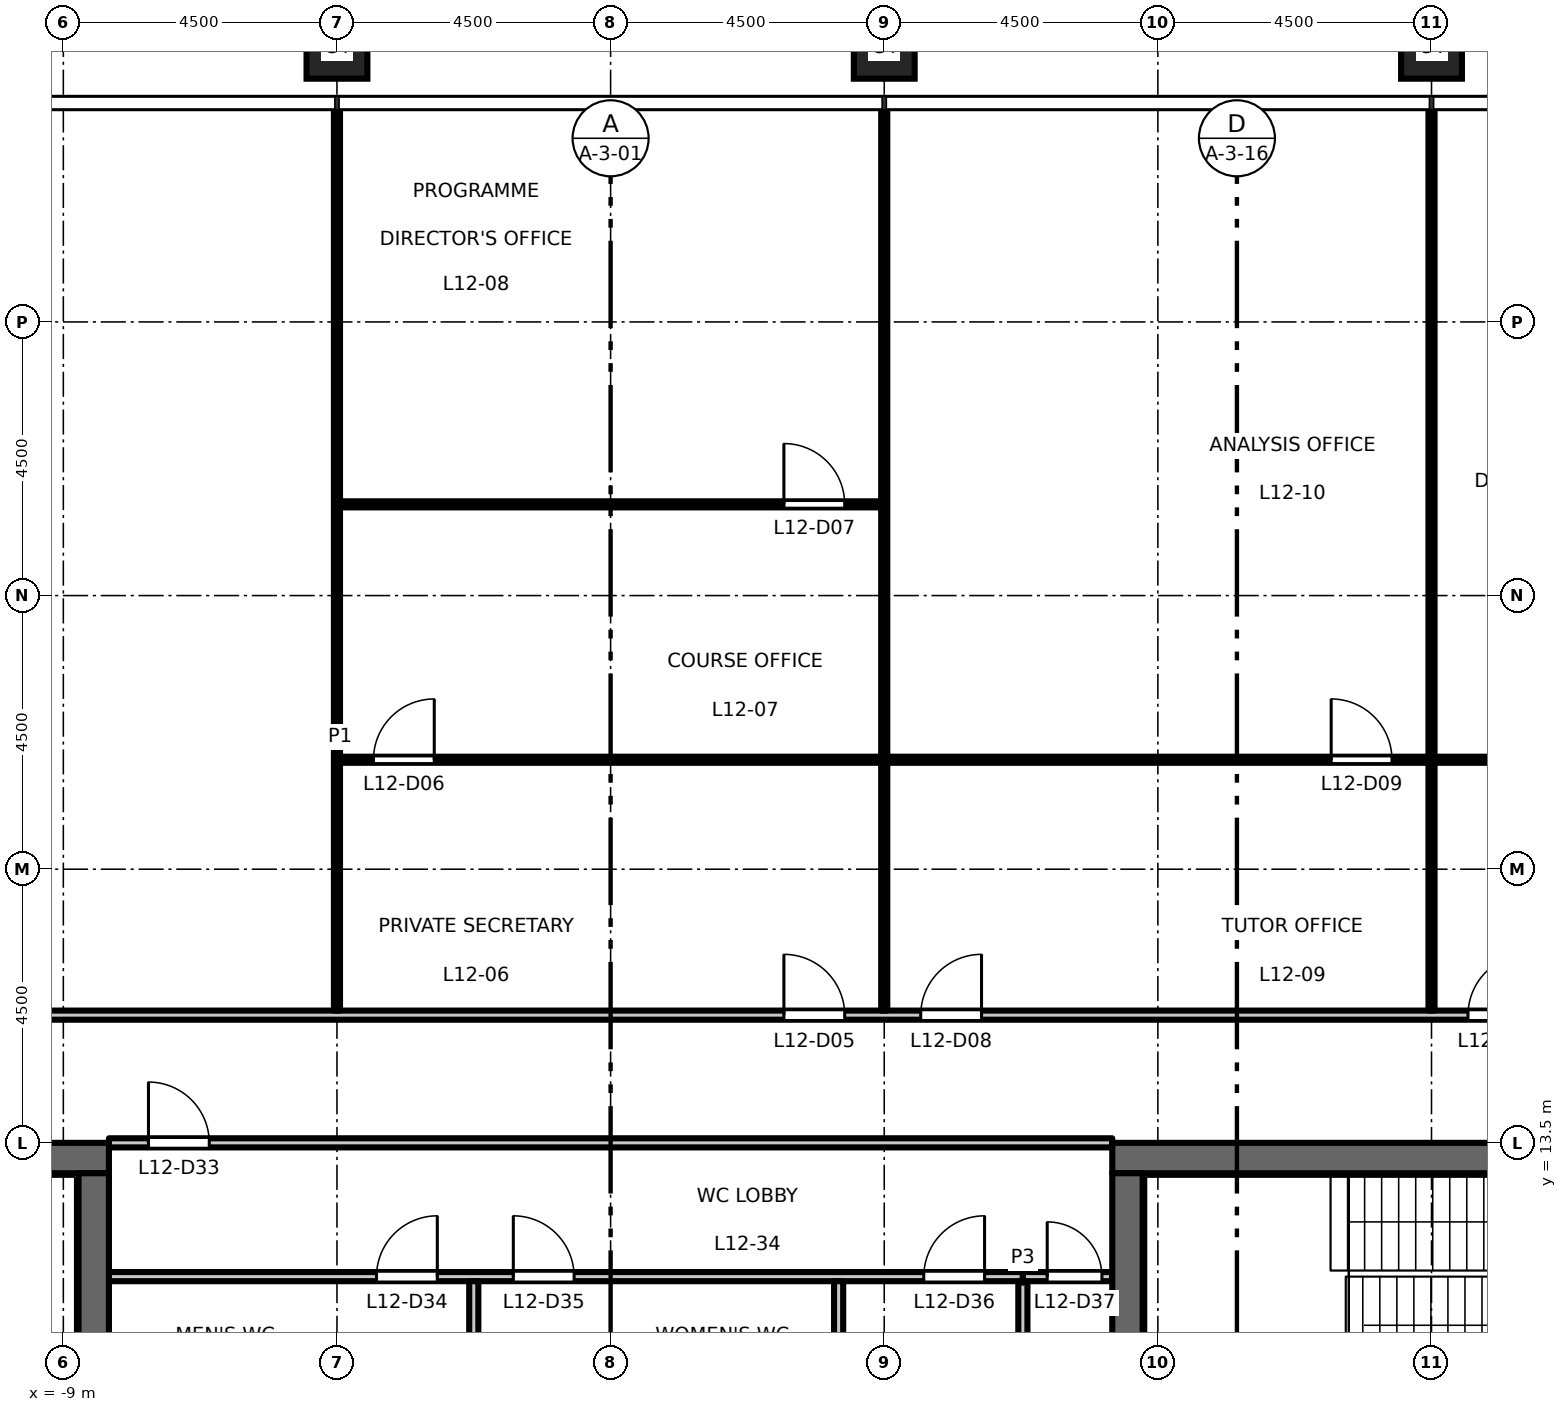
"""IFC4 building model, lengths in metres.
Left out: names, types, materials, properties, quantities, classifications, styles, units other than length and angle.
Written with IfcOpenShell. Run it as: python <this file> out.ifc"""

import sys

from ifc_helpers import new_model, si_unit, direction, frame, frame_2d, origin, origin_2d, place, context, subcontext, project, spatial, rectangle, hollow_rectangle, extrude, element, fill, save


model = new_model("IFC4")
c1 = context("Model", 3, precision=1e-05, world=origin(), true_north=direction((0.0, 1.0)))
c2 = subcontext(c1, "Body", "Model", "MODEL_VIEW")
j1 = project(units=[si_unit("LENGTHUNIT", "METRE"), si_unit("PLANEANGLEUNIT", "RADIAN")], contexts=[c1])
p1 = place(None, origin())
s1 = spatial("IfcSite", under=j1, at=p1, CompositionType="ELEMENT")
p2 = place(p1, origin())
s2 = spatial("IfcBuilding", under=s1, at=p2, CompositionType="ELEMENT")
p3 = place(p2, frame((0.0, 0.0, 58.2)))
s3 = spatial("IfcBuildingStorey", under=s2, at=p3, CompositionType="ELEMENT", Elevation=58.2)
for number, where, z_axis, x_axis in (
    (1, (13.5, 31.5, 0.0), (0.0, 0.0, 1.0), (1.0, 0.0, 0.0)),
    (2, (4.5, 31.5, 0.0), (0.0, 0.0, 1.0), (1.0, 0.0, 0.0)),
    (3, (-4.5, 31.5, 0.0), (0.0, 0.0, 1.0), (1.0, 0.0, 0.0)),
):
    element("IfcColumn", number, at=place(p3, frame(where, z_axis=z_axis, x_axis=x_axis)), inside=s3, PredefinedType="COLUMN", context=c2, shape_type="SweptSolid", body=[
        extrude(hollow_rectangle(XDim=1.0, YDim=1.0, WallThickness=0.06, at=origin_2d()), origin(), (0.0, 0.0, 1.0), 4.5),
    ])
p4 = place(p3, frame((-8.25, 13.25, 0.0), z_axis=(0.0, 0.0, 1.0), x_axis=(-1.0, 0.0, 0.0)))
e4 = element("IfcWall", 4, at=p4, inside=s3, PredefinedType="SHEAR", context=c2, shape_type="SweptSolid", body=[
    extrude(rectangle(XDim=13.5, YDim=0.5, at=frame_2d((6.75, 0.0))), origin(), (0.0, 0.0, 1.0), 4.35),
])
p5 = place(p3, frame((-8.5, -13.0, 0.0), z_axis=(0.0, 0.0, 1.0), x_axis=(0.0, 1.0, 0.0)))
e5 = element("IfcWall", 5, at=p5, inside=s3, PredefinedType="SHEAR", context=c2, shape_type="SweptSolid", body=[
    extrude(rectangle(XDim=26.0, YDim=0.5, at=frame_2d((13.0, 0.0))), origin(), (0.0, 0.0, 1.0), 4.35),
])
p6 = place(p3, frame((8.25, 13.25, 0.0), z_axis=(0.0, 0.0, 1.0), x_axis=(1.0, 0.0, 0.0)))
e6 = element("IfcWall", 6, at=p6, inside=s3, PredefinedType="SHEAR", context=c2, shape_type="SweptSolid", body=[
    extrude(rectangle(XDim=13.5, YDim=0.5, at=frame_2d((6.75, 0.0))), origin(), (0.0, 0.0, 1.0), 4.35),
])
p7 = place(p3, frame((8.5, -13.0, 0.0), z_axis=(0.0, 0.0, 1.0), x_axis=(0.0, 1.0, 0.0)))
e7 = element("IfcWall", 7, at=p7, inside=s3, PredefinedType="SHEAR", context=c2, shape_type="SweptSolid", body=[
    extrude(rectangle(XDim=26.0, YDim=0.5, at=frame_2d((13.0, 0.0))), origin(), (0.0, 0.0, 1.0), 4.35),
])
p8 = place(p3, frame((-8.25, 11.3, 0.0), z_axis=(0.0, 0.0, 1.0), x_axis=(1.0, 0.0, 0.0)))
e8 = element("IfcWall", 8, at=p8, inside=s3, PredefinedType="PARTITIONING", context=c2, shape_type="SweptSolid", body=[
    extrude(rectangle(XDim=15.03, YDim=0.15, at=frame_2d((7.515, 0.0))), origin(), (0.0, 0.0, 1.0), 4.35),
])
p9 = place(p8, frame((4.4, 0.0, 0.0)))
e9 = element("IfcOpeningElement", 9, at=p9, cuts=e8, PredefinedType="OPENING", context=c2, shape_type="SweptSolid", body=[
    extrude(rectangle(XDim=1.0, YDim=2.1, at=frame_2d((0.5, 1.05))), frame((0.0, 0.085, 0.0), z_axis=(0.0, -1.0, 0.0), x_axis=(1.0, 0.0, 0.0)), (0.0, 0.0, 1.0), 0.17),
])
p10 = place(p8, frame((6.65, 0.0, 0.0)))
e10 = element("IfcOpeningElement", 10, at=p10, cuts=e8, PredefinedType="OPENING", context=c2, shape_type="SweptSolid", body=[
    extrude(rectangle(XDim=1.0, YDim=2.1, at=frame_2d((0.5, 1.05))), frame((0.0, 0.085, 0.0), z_axis=(0.0, -1.0, 0.0), x_axis=(1.0, 0.0, 0.0)), (0.0, 0.0, 1.0), 0.17),
])
p11 = place(p8, frame((13.4, 0.0, 0.0)))
e11 = element("IfcOpeningElement", 11, at=p11, cuts=e8, PredefinedType="OPENING", context=c2, shape_type="SweptSolid", body=[
    extrude(rectangle(XDim=1.0, YDim=2.1, at=frame_2d((0.5, 1.05))), frame((0.0, 0.085, 0.0), z_axis=(0.0, -1.0, 0.0), x_axis=(1.0, 0.0, 0.0)), (0.0, 0.0, 1.0), 0.17),
])
p12 = place(p3, frame((6.78, 11.3, 0.0), z_axis=(0.0, 0.0, 1.0), x_axis=(1.0, 0.0, 0.0)))
e12 = element("IfcWall", 12, at=p12, inside=s3, PredefinedType="PARTITIONING", context=c2, shape_type="SweptSolid", body=[
    extrude(rectangle(XDim=1.47, YDim=0.15, at=frame_2d((0.735, 0.0))), origin(), (0.0, 0.0, 1.0), 4.35),
])
p13 = place(p12, frame((0.4, 0.0, 0.0)))
e13 = element("IfcOpeningElement", 13, at=p13, cuts=e12, PredefinedType="OPENING", context=c2, shape_type="SweptSolid", body=[
    extrude(rectangle(XDim=0.9, YDim=2.1, at=frame_2d((0.45, 1.05))), frame((0.0, 0.085, 0.0), z_axis=(0.0, -1.0, 0.0), x_axis=(1.0, 0.0, 0.0)), (0.0, 0.0, 1.0), 0.17),
])
p14 = place(p3, frame((-8.25, 13.5, 0.0), z_axis=(0.0, 0.0, 1.0), x_axis=(1.0, 0.0, 0.0)))
e14 = element("IfcWall", 14, at=p14, inside=s3, PredefinedType="PARTITIONING", context=c2, shape_type="SweptSolid", body=[
    extrude(rectangle(XDim=16.5, YDim=0.15, at=frame_2d((8.25, 0.0))), origin(), (0.0, 0.0, 1.0), 3.85),
])
p15 = place(p14, frame((0.65, 0.0, 0.0)))
e15 = element("IfcOpeningElement", 15, at=p15, cuts=e14, PredefinedType="OPENING", context=c2, shape_type="SweptSolid", body=[
    extrude(rectangle(XDim=1.0, YDim=2.1, at=frame_2d((0.5, 1.05))), frame((0.0, 0.085, 0.0), z_axis=(0.0, -1.0, 0.0), x_axis=(1.0, 0.0, 0.0)), (0.0, 0.0, 1.0), 0.17),
])
p16 = place(p3, frame((-23.925, 15.6, 0.0), z_axis=(0.0, 0.0, 1.0), x_axis=(1.0, 0.0, 0.0)))
e16 = element("IfcWall", 16, at=p16, inside=s3, PredefinedType="PARTITIONING", context=c2, shape_type="SweptSolid", body=[
    extrude(rectangle(XDim=47.85, YDim=0.15, at=frame_2d((23.925, 0.0))), origin(), (0.0, 0.0, 1.0), 4.35),
])
p17 = place(p16, frame((8.775, 0.0, 0.0)))
e17 = element("IfcOpeningElement", 17, at=p17, cuts=e16, PredefinedType="OPENING", context=c2, shape_type="SweptSolid", body=[
    extrude(rectangle(XDim=1.0, YDim=2.1, at=frame_2d((0.5, 1.05))), frame((0.0, 0.085, 0.0), z_axis=(0.0, -1.0, 0.0), x_axis=(1.0, 0.0, 0.0)), (0.0, 0.0, 1.0), 0.17),
])
p18 = place(p16, frame((11.025, 0.0, 0.0)))
e18 = element("IfcOpeningElement", 18, at=p18, cuts=e16, PredefinedType="OPENING", context=c2, shape_type="SweptSolid", body=[
    extrude(rectangle(XDim=1.0, YDim=2.1, at=frame_2d((0.5, 1.05))), frame((0.0, 0.085, 0.0), z_axis=(0.0, -1.0, 0.0), x_axis=(1.0, 0.0, 0.0)), (0.0, 0.0, 1.0), 0.17),
])
p19 = place(p16, frame((26.775, 0.0, 0.0)))
e19 = element("IfcOpeningElement", 19, at=p19, cuts=e16, PredefinedType="OPENING", context=c2, shape_type="SweptSolid", body=[
    extrude(rectangle(XDim=1.0, YDim=2.1, at=frame_2d((0.5, 1.05))), frame((0.0, 0.085, 0.0), z_axis=(0.0, -1.0, 0.0), x_axis=(1.0, 0.0, 0.0)), (0.0, 0.0, 1.0), 0.17),
])
p20 = place(p16, frame((29.025, 0.0, 0.0)))
e20 = element("IfcOpeningElement", 20, at=p20, cuts=e16, PredefinedType="OPENING", context=c2, shape_type="SweptSolid", body=[
    extrude(rectangle(XDim=1.0, YDim=2.1, at=frame_2d((0.5, 1.05))), frame((0.0, 0.085, 0.0), z_axis=(0.0, -1.0, 0.0), x_axis=(1.0, 0.0, 0.0)), (0.0, 0.0, 1.0), 0.17),
])
p21 = place(p16, frame((38.025, 0.0, 0.0)))
e21 = element("IfcOpeningElement", 21, at=p21, cuts=e16, PredefinedType="OPENING", context=c2, shape_type="SweptSolid", body=[
    extrude(rectangle(XDim=1.0, YDim=2.1, at=frame_2d((0.5, 1.05))), frame((0.0, 0.085, 0.0), z_axis=(0.0, -1.0, 0.0), x_axis=(1.0, 0.0, 0.0)), (0.0, 0.0, 1.0), 0.17),
])
p22 = place(p3, frame((-4.45, 19.8, 0.0), z_axis=(0.0, 0.0, 1.0), x_axis=(1.0, 0.0, 0.0)))
e22 = element("IfcWall", 22, at=p22, inside=s3, PredefinedType="PARTITIONING", context=c2, shape_type="SweptSolid", body=[
    extrude(rectangle(XDim=26.9, YDim=0.1, at=frame_2d((13.45, 0.0))), origin(), (0.0, 0.0, 1.0), 4.35),
])
p23 = place(p22, frame((0.55, 0.0, 0.0)))
e23 = element("IfcOpeningElement", 23, at=p23, cuts=e22, PredefinedType="OPENING", context=c2, shape_type="SweptSolid", body=[
    extrude(rectangle(XDim=1.0, YDim=2.1, at=frame_2d((0.5, 1.05))), frame((0.0, 0.06, 0.0), z_axis=(0.0, -1.0, 0.0), x_axis=(1.0, 0.0, 0.0)), (0.0, 0.0, 1.0), 0.12),
])
p24 = place(p22, frame((16.3, 0.0, 0.0)))
e24 = element("IfcOpeningElement", 24, at=p24, cuts=e22, PredefinedType="OPENING", context=c2, shape_type="SweptSolid", body=[
    extrude(rectangle(XDim=1.0, YDim=2.1, at=frame_2d((0.5, 1.05))), frame((0.0, 0.06, 0.0), z_axis=(0.0, -1.0, 0.0), x_axis=(1.0, 0.0, 0.0)), (0.0, 0.0, 1.0), 0.12),
])
p25 = place(p22, frame((25.3, 0.0, 0.0)))
e25 = element("IfcOpeningElement", 25, at=p25, cuts=e22, PredefinedType="OPENING", context=c2, shape_type="SweptSolid", body=[
    extrude(rectangle(XDim=1.0, YDim=2.1, at=frame_2d((0.5, 1.05))), frame((0.0, 0.06, 0.0), z_axis=(0.0, -1.0, 0.0), x_axis=(1.0, 0.0, 0.0)), (0.0, 0.0, 1.0), 0.12),
])
p26 = place(p3, frame((-4.45, 24.0, 0.0), z_axis=(0.0, 0.0, 1.0), x_axis=(1.0, 0.0, 0.0)))
e26 = element("IfcWall", 26, at=p26, inside=s3, PredefinedType="PARTITIONING", context=c2, shape_type="SweptSolid", body=[
    extrude(rectangle(XDim=8.9, YDim=0.1, at=frame_2d((4.45, 0.0))), origin(), (0.0, 0.0, 1.0), 3.85),
])
p27 = place(p26, frame((7.3, 0.0, 0.0)))
e27 = element("IfcOpeningElement", 27, at=p27, cuts=e26, PredefinedType="OPENING", context=c2, shape_type="SweptSolid", body=[
    extrude(rectangle(XDim=1.0, YDim=2.1, at=frame_2d((0.5, 1.05))), frame((0.0, 0.06, 0.0), z_axis=(0.0, -1.0, 0.0), x_axis=(1.0, 0.0, 0.0)), (0.0, 0.0, 1.0), 0.12),
])
p28 = place(p3, frame((-4.5, 15.675, 0.0), z_axis=(0.0, 0.0, 1.0), x_axis=(0.0, 1.0, 0.0)))
e28 = element("IfcWall", 28, at=p28, inside=s3, PredefinedType="PARTITIONING", context=c2, shape_type="SweptSolid", body=[
    extrude(rectangle(XDim=14.835, YDim=0.1, at=frame_2d((7.417, 0.0))), origin(), (0.0, 0.0, 1.0), 3.35),
])
for number, where, z_axis, x_axis in (
    (29, (-2.25, 8.37, 0.0), (0.0, 0.0, 1.0), (0.0, 1.0, 0.0)),
    (30, (3.75, 8.37, 0.0), (0.0, 0.0, 1.0), (0.0, 1.0, 0.0)),
):
    element("IfcWall", number, at=place(p3, frame(where, z_axis=z_axis, x_axis=x_axis)), inside=s3, PredefinedType="PARTITIONING", context=c2, shape_type="SweptSolid", body=[
        extrude(rectangle(XDim=2.855, YDim=0.15, at=frame_2d((1.427, 0.0))), origin(), (0.0, 0.0, 1.0), 4.35),
    ])
p29 = place(p3, frame((4.5, 15.675, 0.0), z_axis=(0.0, 0.0, 1.0), x_axis=(0.0, 1.0, 0.0)))
e31 = element("IfcWall", 31, at=p29, inside=s3, PredefinedType="PARTITIONING", context=c2, shape_type="SweptSolid", body=[
    extrude(rectangle(XDim=4.075, YDim=0.1, at=frame_2d((2.038, 0.0))), origin(), (0.0, 0.0, 1.0), 3.35),
])
p30 = place(p3, frame((4.5, 19.85, 0.0), z_axis=(0.0, 0.0, 1.0), x_axis=(0.0, 1.0, 0.0)))
e32 = element("IfcWall", 32, at=p30, inside=s3, PredefinedType="PARTITIONING", context=c2, shape_type="SweptSolid", body=[
    extrude(rectangle(XDim=10.66, YDim=0.1, at=frame_2d((5.33, 0.0))), origin(), (0.0, 0.0, 1.0), 3.35),
])
p31 = place(p3, frame((6.78, 8.079, 0.0), z_axis=(0.0, 0.0, 1.0), x_axis=(0.0, 1.0, 0.0)))
e33 = element("IfcWall", 33, at=p31, inside=s3, PredefinedType="PARTITIONING", context=c2, shape_type="SweptSolid", body=[
    extrude(rectangle(XDim=3.146, YDim=0.15, at=frame_2d((1.573, 0.0))), origin(), (0.0, 0.0, 1.0), 4.35),
])
p32 = place(p3, frame((13.5, 15.675, 0.0), z_axis=(0.0, 0.0, 1.0), x_axis=(0.0, 1.0, 0.0)))
e34 = element("IfcWall", 34, at=p32, inside=s3, PredefinedType="PARTITIONING", context=c2, shape_type="SweptSolid", body=[
    extrude(rectangle(XDim=4.075, YDim=0.1, at=frame_2d((2.038, 0.0))), origin(), (0.0, 0.0, 1.0), 3.35),
])
p33 = place(p3, frame((13.5, 19.85, 0.0), z_axis=(0.0, 0.0, 1.0), x_axis=(0.0, 1.0, 0.0)))
e35 = element("IfcWall", 35, at=p33, inside=s3, PredefinedType="PARTITIONING", context=c2, shape_type="SweptSolid", body=[
    extrude(rectangle(XDim=10.66, YDim=0.1, at=frame_2d((5.33, 0.0))), origin(), (0.0, 0.0, 1.0), 3.35),
])
p34 = place(p19, origin())
e36 = element("IfcDoor", 36, at=p34, inside=s3, OperationType="SINGLE_SWING_LEFT", PredefinedType="DOOR", context=c2, shape_type="SweptSolid", body=[
    extrude(rectangle(XDim=1.0, YDim=2.1, at=frame_2d((0.5, 1.05))), frame((0.0, 0.025, 0.0), z_axis=(0.0, -1.0, 0.0), x_axis=(1.0, 0.0, 0.0)), (0.0, 0.0, 1.0), 0.05),
])
fill(e19, e36)
p35 = place(p23, origin())
e37 = element("IfcDoor", 37, at=p35, inside=s3, OperationType="SINGLE_SWING_RIGHT", PredefinedType="DOOR", context=c2, shape_type="SweptSolid", body=[
    extrude(rectangle(XDim=1.0, YDim=2.1, at=frame_2d((0.5, 1.05))), frame((0.0, 0.025, 0.0), z_axis=(0.0, -1.0, 0.0), x_axis=(1.0, 0.0, 0.0)), (0.0, 0.0, 1.0), 0.05),
])
fill(e23, e37)
p36 = place(p27, origin())
e38 = element("IfcDoor", 38, at=p36, inside=s3, OperationType="SINGLE_SWING_LEFT", PredefinedType="DOOR", context=c2, shape_type="SweptSolid", body=[
    extrude(rectangle(XDim=1.0, YDim=2.1, at=frame_2d((0.5, 1.05))), frame((0.0, 0.025, 0.0), z_axis=(0.0, -1.0, 0.0), x_axis=(1.0, 0.0, 0.0)), (0.0, 0.0, 1.0), 0.05),
])
fill(e27, e38)
p37 = place(p20, origin())
e39 = element("IfcDoor", 39, at=p37, inside=s3, OperationType="SINGLE_SWING_RIGHT", PredefinedType="DOOR", context=c2, shape_type="SweptSolid", body=[
    extrude(rectangle(XDim=1.0, YDim=2.1, at=frame_2d((0.5, 1.05))), frame((0.0, 0.025, 0.0), z_axis=(0.0, -1.0, 0.0), x_axis=(1.0, 0.0, 0.0)), (0.0, 0.0, 1.0), 0.05),
])
fill(e20, e39)
p38 = place(p24, origin())
e40 = element("IfcDoor", 40, at=p38, inside=s3, OperationType="SINGLE_SWING_LEFT", PredefinedType="DOOR", context=c2, shape_type="SweptSolid", body=[
    extrude(rectangle(XDim=1.0, YDim=2.1, at=frame_2d((0.5, 1.05))), frame((0.0, 0.025, 0.0), z_axis=(0.0, -1.0, 0.0), x_axis=(1.0, 0.0, 0.0)), (0.0, 0.0, 1.0), 0.05),
])
fill(e24, e40)
p39 = place(p21, origin())
e41 = element("IfcDoor", 41, at=p39, inside=s3, OperationType="SINGLE_SWING_RIGHT", PredefinedType="DOOR", context=c2, shape_type="SweptSolid", body=[
    extrude(rectangle(XDim=1.0, YDim=2.1, at=frame_2d((0.5, 1.05))), frame((0.0, 0.025, 0.0), z_axis=(0.0, -1.0, 0.0), x_axis=(1.0, 0.0, 0.0)), (0.0, 0.0, 1.0), 0.05),
])
fill(e21, e41)
p40 = place(p15, origin())
e42 = element("IfcDoor", 42, at=p40, inside=s3, OperationType="SINGLE_SWING_LEFT", PredefinedType="DOOR", context=c2, shape_type="SweptSolid", body=[
    extrude(rectangle(XDim=1.0, YDim=2.1, at=frame_2d((0.5, 1.05))), frame((0.0, 0.025, 0.0), z_axis=(0.0, -1.0, 0.0), x_axis=(1.0, 0.0, 0.0)), (0.0, 0.0, 1.0), 0.05),
])
fill(e15, e42)
p41 = place(p9, origin())
e43 = element("IfcDoor", 43, at=p41, inside=s3, OperationType="SINGLE_SWING_RIGHT", PredefinedType="DOOR", context=c2, shape_type="SweptSolid", body=[
    extrude(rectangle(XDim=1.0, YDim=2.1, at=frame_2d((0.5, 1.05))), frame((0.0, 0.025, 0.0), z_axis=(0.0, -1.0, 0.0), x_axis=(1.0, 0.0, 0.0)), (0.0, 0.0, 1.0), 0.05),
])
fill(e9, e43)
p42 = place(p10, origin())
e44 = element("IfcDoor", 44, at=p42, inside=s3, OperationType="SINGLE_SWING_LEFT", PredefinedType="DOOR", context=c2, shape_type="SweptSolid", body=[
    extrude(rectangle(XDim=1.0, YDim=2.1, at=frame_2d((0.5, 1.05))), frame((0.0, 0.025, 0.0), z_axis=(0.0, -1.0, 0.0), x_axis=(1.0, 0.0, 0.0)), (0.0, 0.0, 1.0), 0.05),
])
fill(e10, e44)
p43 = place(p11, origin())
e45 = element("IfcDoor", 45, at=p43, inside=s3, OperationType="SINGLE_SWING_RIGHT", PredefinedType="DOOR", context=c2, shape_type="SweptSolid", body=[
    extrude(rectangle(XDim=1.0, YDim=2.1, at=frame_2d((0.5, 1.05))), frame((0.0, 0.025, 0.0), z_axis=(0.0, -1.0, 0.0), x_axis=(1.0, 0.0, 0.0)), (0.0, 0.0, 1.0), 0.05),
])
fill(e11, e45)
p44 = place(p13, origin())
e46 = element("IfcDoor", 46, at=p44, inside=s3, OperationType="SINGLE_SWING_LEFT", PredefinedType="DOOR", context=c2, shape_type="SweptSolid", body=[
    extrude(rectangle(XDim=0.9, YDim=2.1, at=frame_2d((0.45, 1.05))), frame((0.0, 0.025, 0.0), z_axis=(0.0, -1.0, 0.0), x_axis=(1.0, 0.0, 0.0)), (0.0, 0.0, 1.0), 0.05),
])
fill(e13, e46)
save(model, sys.argv[1])
